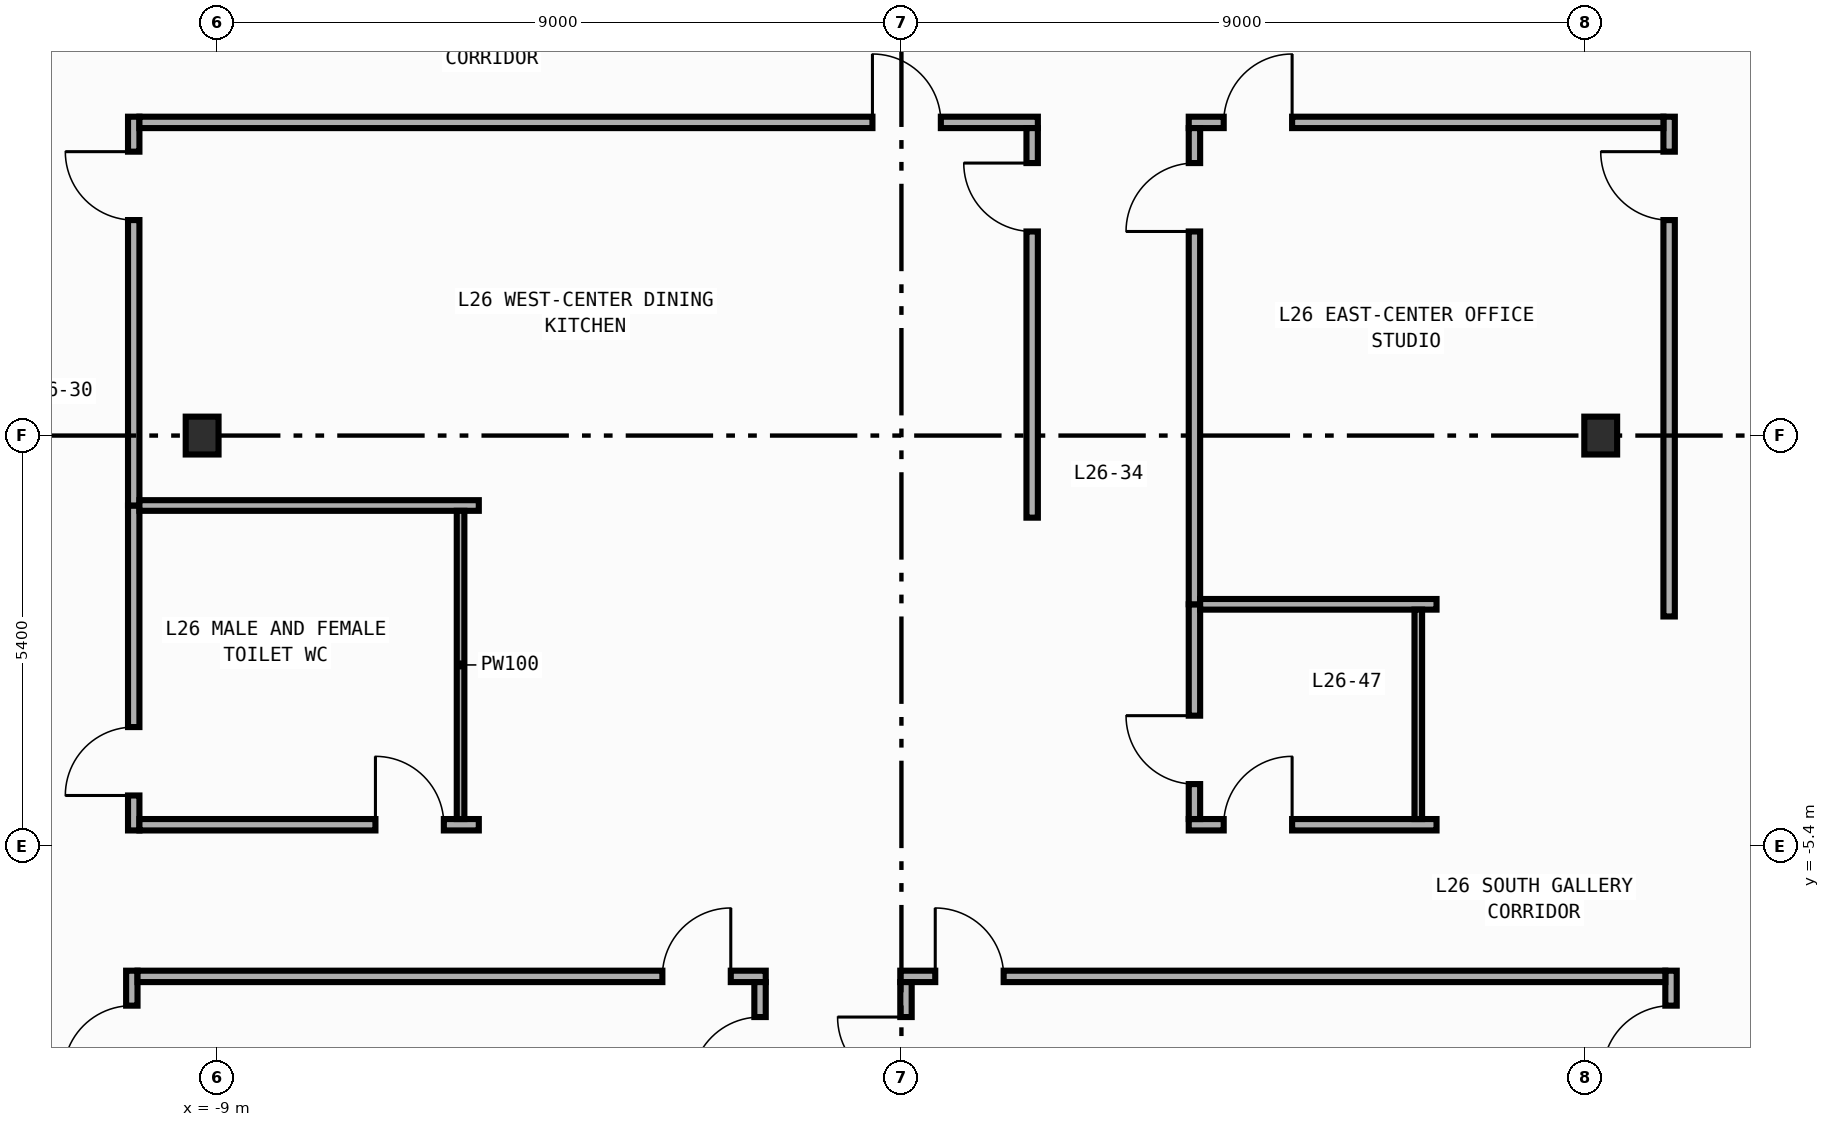
"""IFC4 building model, lengths in metres.
Left out: names, types, materials, properties, quantities, classifications, styles, units other than length and angle.
Written with IfcOpenShell. Run it as: python <this file> out.ifc"""

import sys

from ifc_helpers import new_model, si_unit, direction, frame, frame_2d, origin, origin_2d, place, context, subcontext, project, spatial, rectangle, i_section, extrude, element, fill, save


model = new_model("IFC4")
c1 = context("Model", 3, precision=1e-05, world=origin(), true_north=direction((0.0, 1.0)))
c2 = subcontext(c1, "Body", "Model", "MODEL_VIEW")
j1 = project(units=[si_unit("LENGTHUNIT", "METRE"), si_unit("PLANEANGLEUNIT", "RADIAN")], contexts=[c1])
p1 = place(None, origin())
s1 = spatial("IfcSite", under=j1, at=p1, CompositionType="ELEMENT")
p2 = place(p1, origin())
s2 = spatial("IfcBuilding", under=s1, at=p2, CompositionType="ELEMENT")
p3 = place(p2, frame((0.0, 0.0, 114.2)))
s3 = spatial("IfcBuildingStorey", under=s2, at=p3, CompositionType="ELEMENT", Elevation=114.2)
for number, where, z_axis, x_axis in (
    (1, (-9.2, 0.0, 0.0), (0.0, 0.0, 1.0), (1.0, 0.0, 0.0)),
    (2, (9.2, 0.0, 0.0), (0.0, 0.0, 1.0), (1.0, 0.0, 0.0)),
):
    element("IfcColumn", number, at=place(p3, frame(where, z_axis=z_axis, x_axis=x_axis)), inside=s3, PredefinedType="COLUMN", context=c2, shape_type="SweptSolid", body=[
        extrude(i_section(OverallWidth=0.432, OverallDepth=0.498, WebThickness=0.045, FlangeThickness=0.07, FilletRadius=0.022, at=origin_2d()), origin(), (0.0, 0.0, 1.0), 4.2),
    ])
p4 = place(p3, frame((-10.1, -5.195, 0.0), z_axis=(0.0, 0.0, 1.0), x_axis=(0.0, 1.0, 0.0)))
e3 = element("IfcWall", 3, at=p4, inside=s3, PredefinedType="PARTITIONING", context=c2, shape_type="SweptSolid", body=[
    extrude(rectangle(XDim=4.275, YDim=0.15, at=frame_2d((2.138, 0.0))), origin(), (0.0, 0.0, 1.0), 3.94),
])
p5 = place(p4, frame((0.46, 0.0, 0.0)))
e4 = element("IfcOpeningElement", 4, at=p5, cuts=e3, PredefinedType="OPENING", context=c2, shape_type="SweptSolid", body=[
    extrude(rectangle(XDim=0.9, YDim=2.15, at=frame_2d((0.45, 1.075))), frame((0.0, 0.085, 0.0), z_axis=(0.0, -1.0, 0.0), x_axis=(1.0, 0.0, 0.0)), (0.0, 0.0, 1.0), 0.17),
])
p6 = place(p3, frame((-10.1, -0.92, 0.0), z_axis=(0.0, 0.0, 1.0), x_axis=(0.0, 1.0, 0.0)))
e5 = element("IfcWall", 5, at=p6, inside=s3, PredefinedType="PARTITIONING", context=c2, shape_type="SweptSolid", body=[
    extrude(rectangle(XDim=5.115, YDim=0.15, at=frame_2d((2.558, 0.0))), origin(), (0.0, 0.0, 1.0), 3.94),
])
p7 = place(p6, frame((3.755, 0.0, 0.0)))
e6 = element("IfcOpeningElement", 6, at=p7, cuts=e5, PredefinedType="OPENING", context=c2, shape_type="SweptSolid", body=[
    extrude(rectangle(XDim=0.9, YDim=2.15, at=frame_2d((0.45, 1.075))), frame((0.0, 0.085, 0.0), z_axis=(0.0, -1.0, 0.0), x_axis=(1.0, 0.0, 0.0)), (0.0, 0.0, 1.0), 0.17),
])
p8 = place(p3, frame((-10.125, -12.44, 0.0), z_axis=(0.0, 0.0, 1.0), x_axis=(0.0, 1.0, 0.0)))
e7 = element("IfcWall", 7, at=p8, inside=s3, PredefinedType="PARTITIONING", context=c2, shape_type="SweptSolid", body=[
    extrude(rectangle(XDim=5.4, YDim=0.15, at=frame_2d((2.7, 0.0))), origin(), (0.0, 0.0, 1.0), 3.94),
])
p9 = place(p8, frame((4.04, 0.0, 0.0)))
e8 = element("IfcOpeningElement", 8, at=p9, cuts=e7, PredefinedType="OPENING", context=c2, shape_type="SweptSolid", body=[
    extrude(rectangle(XDim=0.9, YDim=2.15, at=frame_2d((0.45, 1.075))), frame((0.0, 0.085, 0.0), z_axis=(0.0, -1.0, 0.0), x_axis=(1.0, 0.0, 0.0)), (0.0, 0.0, 1.0), 0.17),
])
p10 = place(p3, frame((10.1, -2.38, 0.0), z_axis=(0.0, 0.0, 1.0), x_axis=(0.0, 1.0, 0.0)))
e9 = element("IfcWall", 9, at=p10, inside=s3, PredefinedType="PARTITIONING", context=c2, shape_type="SweptSolid", body=[
    extrude(rectangle(XDim=6.575, YDim=0.15, at=frame_2d((3.288, 0.0))), origin(), (0.0, 0.0, 1.0), 3.94),
])
p11 = place(p10, frame((5.215, 0.0, 0.0)))
e10 = element("IfcOpeningElement", 10, at=p11, cuts=e9, PredefinedType="OPENING", context=c2, shape_type="SweptSolid", body=[
    extrude(rectangle(XDim=0.9, YDim=2.15, at=frame_2d((0.45, 1.075))), frame((0.0, 0.085, 0.0), z_axis=(0.0, -1.0, 0.0), x_axis=(1.0, 0.0, 0.0)), (0.0, 0.0, 1.0), 0.17),
])
p12 = place(p3, frame((10.125, -14.44, 0.0), z_axis=(0.0, 0.0, 1.0), x_axis=(0.0, 1.0, 0.0)))
e11 = element("IfcWall", 11, at=p12, inside=s3, PredefinedType="PARTITIONING", context=c2, shape_type="SweptSolid", body=[
    extrude(rectangle(XDim=7.4, YDim=0.15, at=frame_2d((3.7, 0.0))), origin(), (0.0, 0.0, 1.0), 3.94),
])
p13 = place(p12, frame((6.04, 0.0, 0.0)))
e12 = element("IfcOpeningElement", 12, at=p13, cuts=e11, PredefinedType="OPENING", context=c2, shape_type="SweptSolid", body=[
    extrude(rectangle(XDim=0.9, YDim=2.15, at=frame_2d((0.45, 1.075))), frame((0.0, 0.085, 0.0), z_axis=(0.0, -1.0, 0.0), x_axis=(1.0, 0.0, 0.0)), (0.0, 0.0, 1.0), 0.17),
])
p14 = place(p3, frame((3.78, 4.12, 0.0), z_axis=(0.0, 0.0, 1.0), x_axis=(1.0, 0.0, 0.0)))
e13 = element("IfcWall", 13, at=p14, inside=s3, PredefinedType="PARTITIONING", context=c2, shape_type="SweptSolid", body=[
    extrude(rectangle(XDim=6.245, YDim=0.15, at=frame_2d((3.123, 0.0))), origin(), (0.0, 0.0, 1.0), 3.94),
])
p15 = place(p14, frame((0.46, 0.0, 0.0)))
e14 = element("IfcOpeningElement", 14, at=p15, cuts=e13, PredefinedType="OPENING", context=c2, shape_type="SweptSolid", body=[
    extrude(rectangle(XDim=0.9, YDim=2.15, at=frame_2d((0.45, 1.075))), frame((0.0, 0.085, 0.0), z_axis=(0.0, -1.0, 0.0), x_axis=(1.0, 0.0, 0.0)), (0.0, 0.0, 1.0), 0.17),
])
p16 = place(p3, frame((-10.025, 4.12, 0.0), z_axis=(0.0, 0.0, 1.0), x_axis=(1.0, 0.0, 0.0)))
e15 = element("IfcWall", 15, at=p16, inside=s3, PredefinedType="PARTITIONING", context=c2, shape_type="SweptSolid", body=[
    extrude(rectangle(XDim=11.82, YDim=0.15, at=frame_2d((5.91, 0.0))), origin(), (0.0, 0.0, 1.0), 3.94),
])
p17 = place(p16, frame((9.644, 0.0, 0.0)))
e16 = element("IfcOpeningElement", 16, at=p17, cuts=e15, PredefinedType="OPENING", context=c2, shape_type="SweptSolid", body=[
    extrude(rectangle(XDim=0.9, YDim=2.15, at=frame_2d((0.45, 1.075))), frame((0.0, 0.085, 0.0), z_axis=(0.0, -1.0, 0.0), x_axis=(1.0, 0.0, 0.0)), (0.0, 0.0, 1.0), 0.17),
])
p18 = place(p3, frame((3.78, -5.12, 0.0), z_axis=(0.0, 0.0, 1.0), x_axis=(1.0, 0.0, 0.0)))
e17 = element("IfcWall", 17, at=p18, inside=s3, PredefinedType="PARTITIONING", context=c2, shape_type="SweptSolid", body=[
    extrude(rectangle(XDim=3.26, YDim=0.15, at=frame_2d((1.63, 0.0))), origin(), (0.0, 0.0, 1.0), 3.94),
])
p19 = place(p18, frame((0.46, 0.0, 0.0)))
e18 = element("IfcOpeningElement", 18, at=p19, cuts=e17, PredefinedType="OPENING", context=c2, shape_type="SweptSolid", body=[
    extrude(rectangle(XDim=0.9, YDim=2.15, at=frame_2d((0.45, 1.075))), frame((0.0, 0.085, 0.0), z_axis=(0.0, -1.0, 0.0), x_axis=(1.0, 0.0, 0.0)), (0.0, 0.0, 1.0), 0.17),
])
p20 = place(p3, frame((-10.025, -5.12, 0.0), z_axis=(0.0, 0.0, 1.0), x_axis=(1.0, 0.0, 0.0)))
e19 = element("IfcWall", 19, at=p20, inside=s3, PredefinedType="PARTITIONING", context=c2, shape_type="SweptSolid", body=[
    extrude(rectangle(XDim=4.465, YDim=0.15, at=frame_2d((2.232, 0.0))), origin(), (0.0, 0.0, 1.0), 3.94),
])
p21 = place(p20, frame((3.105, 0.0, 0.0)))
e20 = element("IfcOpeningElement", 20, at=p21, cuts=e19, PredefinedType="OPENING", context=c2, shape_type="SweptSolid", body=[
    extrude(rectangle(XDim=0.9, YDim=2.15, at=frame_2d((0.45, 1.075))), frame((0.0, 0.085, 0.0), z_axis=(0.0, -1.0, 0.0), x_axis=(1.0, 0.0, 0.0)), (0.0, 0.0, 1.0), 0.17),
])
p22 = place(p3, frame((-10.05, -7.115, 0.0), z_axis=(0.0, 0.0, 1.0), x_axis=(1.0, 0.0, 0.0)))
e21 = element("IfcWall", 21, at=p22, inside=s3, PredefinedType="PARTITIONING", context=c2, shape_type="SweptSolid", body=[
    extrude(rectangle(XDim=8.265, YDim=0.15, at=frame_2d((4.133, 0.0))), origin(), (0.0, 0.0, 1.0), 3.94),
])
p23 = place(p22, frame((6.905, 0.0, 0.0)))
e22 = element("IfcOpeningElement", 22, at=p23, cuts=e21, PredefinedType="OPENING", context=c2, shape_type="SweptSolid", body=[
    extrude(rectangle(XDim=0.9, YDim=2.15, at=frame_2d((0.45, 1.075))), frame((0.0, 0.085, 0.0), z_axis=(0.0, -1.0, 0.0), x_axis=(1.0, 0.0, 0.0)), (0.0, 0.0, 1.0), 0.17),
])
p24 = place(p3, frame((-0.015, -7.115, 0.0), z_axis=(0.0, 0.0, 1.0), x_axis=(1.0, 0.0, 0.0)))
e23 = element("IfcWall", 23, at=p24, inside=s3, PredefinedType="PARTITIONING", context=c2, shape_type="SweptSolid", body=[
    extrude(rectangle(XDim=10.065, YDim=0.15, at=frame_2d((5.032, 0.0))), origin(), (0.0, 0.0, 1.0), 3.94),
])
p25 = place(p24, frame((0.46, 0.0, 0.0)))
e24 = element("IfcOpeningElement", 24, at=p25, cuts=e23, PredefinedType="OPENING", context=c2, shape_type="SweptSolid", body=[
    extrude(rectangle(XDim=0.9, YDim=2.15, at=frame_2d((0.45, 1.075))), frame((0.0, 0.085, 0.0), z_axis=(0.0, -1.0, 0.0), x_axis=(1.0, 0.0, 0.0)), (0.0, 0.0, 1.0), 0.17),
])
p26 = place(p3, frame((3.855, -5.045, 0.0), z_axis=(0.0, 0.0, 1.0), x_axis=(0.0, 1.0, 0.0)))
e25 = element("IfcWall", 25, at=p26, inside=s3, PredefinedType="PARTITIONING", context=c2, shape_type="SweptSolid", body=[
    extrude(rectangle(XDim=2.825, YDim=0.15, at=frame_2d((1.413, 0.0))), origin(), (0.0, 0.0, 1.0), 3.94),
])
p27 = place(p26, frame((0.46, 0.0, 0.0)))
e26 = element("IfcOpeningElement", 26, at=p27, cuts=e25, PredefinedType="OPENING", context=c2, shape_type="SweptSolid", body=[
    extrude(rectangle(XDim=0.9, YDim=2.15, at=frame_2d((0.45, 1.075))), frame((0.0, 0.085, 0.0), z_axis=(0.0, -1.0, 0.0), x_axis=(1.0, 0.0, 0.0)), (0.0, 0.0, 1.0), 0.17),
])
p28 = place(p3, frame((3.855, -2.22, 0.0), z_axis=(0.0, 0.0, 1.0), x_axis=(0.0, 1.0, 0.0)))
e27 = element("IfcWall", 27, at=p28, inside=s3, PredefinedType="PARTITIONING", context=c2, shape_type="SweptSolid", body=[
    extrude(rectangle(XDim=6.265, YDim=0.15, at=frame_2d((3.132, 0.0))), origin(), (0.0, 0.0, 1.0), 3.94),
])
p29 = place(p28, frame((4.905, 0.0, 0.0)))
e28 = element("IfcOpeningElement", 28, at=p29, cuts=e27, PredefinedType="OPENING", context=c2, shape_type="SweptSolid", body=[
    extrude(rectangle(XDim=0.9, YDim=2.15, at=frame_2d((0.45, 1.075))), frame((0.0, 0.085, 0.0), z_axis=(0.0, -1.0, 0.0), x_axis=(1.0, 0.0, 0.0)), (0.0, 0.0, 1.0), 0.17),
])
p30 = place(p3, frame((1.72, -1.08, 0.0), z_axis=(0.0, 0.0, 1.0), x_axis=(0.0, 1.0, 0.0)))
e29 = element("IfcWall", 29, at=p30, inside=s3, PredefinedType="PARTITIONING", context=c2, shape_type="SweptSolid", body=[
    extrude(rectangle(XDim=5.125, YDim=0.15, at=frame_2d((2.562, 0.0))), origin(), (0.0, 0.0, 1.0), 3.94),
])
p31 = place(p30, frame((3.765, 0.0, 0.0)))
e30 = element("IfcOpeningElement", 30, at=p31, cuts=e29, PredefinedType="OPENING", context=c2, shape_type="SweptSolid", body=[
    extrude(rectangle(XDim=0.9, YDim=2.15, at=frame_2d((0.45, 1.075))), frame((0.0, 0.085, 0.0), z_axis=(0.0, -1.0, 0.0), x_axis=(1.0, 0.0, 0.0)), (0.0, 0.0, 1.0), 0.17),
])
p32 = place(p3, frame((-1.86, -14.865, 0.0), z_axis=(0.0, 0.0, 1.0), x_axis=(0.0, 1.0, 0.0)))
e31 = element("IfcWall", 31, at=p32, inside=s3, PredefinedType="PARTITIONING", context=c2, shape_type="SweptSolid", body=[
    extrude(rectangle(XDim=7.675, YDim=0.15, at=frame_2d((3.837, 0.0))), origin(), (0.0, 0.0, 1.0), 3.94),
])
p33 = place(p32, frame((6.315, 0.0, 0.0)))
e32 = element("IfcOpeningElement", 32, at=p33, cuts=e31, PredefinedType="OPENING", context=c2, shape_type="SweptSolid", body=[
    extrude(rectangle(XDim=0.9, YDim=2.15, at=frame_2d((0.45, 1.075))), frame((0.0, 0.085, 0.0), z_axis=(0.0, -1.0, 0.0), x_axis=(1.0, 0.0, 0.0)), (0.0, 0.0, 1.0), 0.17),
])
p34 = place(p3, frame((0.06, -14.865, 0.0), z_axis=(0.0, 0.0, 1.0), x_axis=(0.0, 1.0, 0.0)))
e33 = element("IfcWall", 33, at=p34, inside=s3, PredefinedType="PARTITIONING", context=c2, shape_type="SweptSolid", body=[
    extrude(rectangle(XDim=7.675, YDim=0.15, at=frame_2d((3.837, 0.0))), origin(), (0.0, 0.0, 1.0), 3.94),
])
p35 = place(p34, frame((6.315, 0.0, 0.0)))
e34 = element("IfcOpeningElement", 34, at=p35, cuts=e33, PredefinedType="OPENING", context=c2, shape_type="SweptSolid", body=[
    extrude(rectangle(XDim=0.9, YDim=2.15, at=frame_2d((0.45, 1.075))), frame((0.0, 0.085, 0.0), z_axis=(0.0, -1.0, 0.0), x_axis=(1.0, 0.0, 0.0)), (0.0, 0.0, 1.0), 0.17),
])
p36 = place(p3, frame((3.93, -2.22, 0.0), z_axis=(0.0, 0.0, 1.0), x_axis=(1.0, 0.0, 0.0)))
e35 = element("IfcWall", 35, at=p36, inside=s3, PredefinedType="PARTITIONING", context=c2, shape_type="SweptSolid", body=[
    extrude(rectangle(XDim=3.11, YDim=0.14, at=frame_2d((1.555, 0.0))), origin(), (0.0, 0.0, 1.0), 3.94),
])
p37 = place(p3, frame((-10.025, -0.92, 0.0), z_axis=(0.0, 0.0, 1.0), x_axis=(1.0, 0.0, 0.0)))
e36 = element("IfcWall", 36, at=p37, inside=s3, PredefinedType="PARTITIONING", context=c2, shape_type="SweptSolid", body=[
    extrude(rectangle(XDim=4.465, YDim=0.14, at=frame_2d((2.232, 0.0))), origin(), (0.0, 0.0, 1.0), 3.94),
])
p38 = place(p3, frame((6.8, -2.29, 0.0), z_axis=(0.0, 0.0, 1.0), x_axis=(0.0, -1.0, 0.0)))
e37 = element("IfcWall", 37, at=p38, inside=s3, PredefinedType="PARTITIONING", context=c2, shape_type="SweptSolid", body=[
    extrude(rectangle(XDim=2.755, YDim=0.1, at=frame_2d((1.377, 0.0))), origin(), (0.0, 0.0, 1.0), 3.94),
])
p39 = place(p3, frame((-5.8, -0.99, 0.0), z_axis=(0.0, 0.0, 1.0), x_axis=(0.0, -1.0, 0.0)))
e38 = element("IfcWall", 38, at=p39, inside=s3, PredefinedType="PARTITIONING", context=c2, shape_type="SweptSolid", body=[
    extrude(rectangle(XDim=4.055, YDim=0.1, at=frame_2d((2.027, 0.0))), origin(), (0.0, 0.0, 1.0), 3.94),
])
p40 = place(p5, origin())
e39 = element("IfcDoor", 39, at=p40, inside=s3, OperationType="SINGLE_SWING_LEFT", PredefinedType="DOOR", context=c2, shape_type="SweptSolid", body=[
    extrude(rectangle(XDim=0.9, YDim=2.15, at=frame_2d((0.45, 1.075))), frame((0.0, 0.025, 0.0), z_axis=(0.0, -1.0, 0.0), x_axis=(1.0, 0.0, 0.0)), (0.0, 0.0, 1.0), 0.05),
])
fill(e4, e39)
p41 = place(p7, origin())
e40 = element("IfcDoor", 40, at=p41, inside=s3, OperationType="SINGLE_SWING_RIGHT", PredefinedType="DOOR", context=c2, shape_type="SweptSolid", body=[
    extrude(rectangle(XDim=0.9, YDim=2.15, at=frame_2d((0.45, 1.075))), frame((0.0, 0.025, 0.0), z_axis=(0.0, -1.0, 0.0), x_axis=(1.0, 0.0, 0.0)), (0.0, 0.0, 1.0), 0.05),
])
fill(e6, e40)
p42 = place(p9, origin())
e41 = element("IfcDoor", 41, at=p42, inside=s3, OperationType="SINGLE_SWING_LEFT", PredefinedType="DOOR", context=c2, shape_type="SweptSolid", body=[
    extrude(rectangle(XDim=0.9, YDim=2.15, at=frame_2d((0.45, 1.075))), frame((0.0, 0.025, 0.0), z_axis=(0.0, -1.0, 0.0), x_axis=(1.0, 0.0, 0.0)), (0.0, 0.0, 1.0), 0.05),
])
fill(e8, e41)
p43 = place(p11, origin())
e42 = element("IfcDoor", 42, at=p43, inside=s3, OperationType="SINGLE_SWING_RIGHT", PredefinedType="DOOR", context=c2, shape_type="SweptSolid", body=[
    extrude(rectangle(XDim=0.9, YDim=2.15, at=frame_2d((0.45, 1.075))), frame((0.0, 0.025, 0.0), z_axis=(0.0, -1.0, 0.0), x_axis=(1.0, 0.0, 0.0)), (0.0, 0.0, 1.0), 0.05),
])
fill(e10, e42)
p44 = place(p13, origin())
e43 = element("IfcDoor", 43, at=p44, inside=s3, OperationType="SINGLE_SWING_LEFT", PredefinedType="DOOR", context=c2, shape_type="SweptSolid", body=[
    extrude(rectangle(XDim=0.9, YDim=2.15, at=frame_2d((0.45, 1.075))), frame((0.0, 0.025, 0.0), z_axis=(0.0, -1.0, 0.0), x_axis=(1.0, 0.0, 0.0)), (0.0, 0.0, 1.0), 0.05),
])
fill(e12, e43)
p45 = place(p15, origin())
e44 = element("IfcDoor", 44, at=p45, inside=s3, OperationType="SINGLE_SWING_RIGHT", PredefinedType="DOOR", context=c2, shape_type="SweptSolid", body=[
    extrude(rectangle(XDim=0.9, YDim=2.15, at=frame_2d((0.45, 1.075))), frame((0.0, 0.025, 0.0), z_axis=(0.0, -1.0, 0.0), x_axis=(1.0, 0.0, 0.0)), (0.0, 0.0, 1.0), 0.05),
])
fill(e14, e44)
p46 = place(p17, origin())
e45 = element("IfcDoor", 45, at=p46, inside=s3, OperationType="SINGLE_SWING_LEFT", PredefinedType="DOOR", context=c2, shape_type="SweptSolid", body=[
    extrude(rectangle(XDim=0.9, YDim=2.15, at=frame_2d((0.45, 1.075))), frame((0.0, 0.025, 0.0), z_axis=(0.0, -1.0, 0.0), x_axis=(1.0, 0.0, 0.0)), (0.0, 0.0, 1.0), 0.05),
])
fill(e16, e45)
p47 = place(p19, origin())
e46 = element("IfcDoor", 46, at=p47, inside=s3, OperationType="SINGLE_SWING_RIGHT", PredefinedType="DOOR", context=c2, shape_type="SweptSolid", body=[
    extrude(rectangle(XDim=0.9, YDim=2.15, at=frame_2d((0.45, 1.075))), frame((0.0, 0.025, 0.0), z_axis=(0.0, -1.0, 0.0), x_axis=(1.0, 0.0, 0.0)), (0.0, 0.0, 1.0), 0.05),
])
fill(e18, e46)
p48 = place(p21, origin())
e47 = element("IfcDoor", 47, at=p48, inside=s3, OperationType="SINGLE_SWING_LEFT", PredefinedType="DOOR", context=c2, shape_type="SweptSolid", body=[
    extrude(rectangle(XDim=0.9, YDim=2.15, at=frame_2d((0.45, 1.075))), frame((0.0, 0.025, 0.0), z_axis=(0.0, -1.0, 0.0), x_axis=(1.0, 0.0, 0.0)), (0.0, 0.0, 1.0), 0.05),
])
fill(e20, e47)
p49 = place(p23, origin())
e48 = element("IfcDoor", 48, at=p49, inside=s3, OperationType="SINGLE_SWING_RIGHT", PredefinedType="DOOR", context=c2, shape_type="SweptSolid", body=[
    extrude(rectangle(XDim=0.9, YDim=2.15, at=frame_2d((0.45, 1.075))), frame((0.0, 0.025, 0.0), z_axis=(0.0, -1.0, 0.0), x_axis=(1.0, 0.0, 0.0)), (0.0, 0.0, 1.0), 0.05),
])
fill(e22, e48)
p50 = place(p25, origin())
e49 = element("IfcDoor", 49, at=p50, inside=s3, OperationType="SINGLE_SWING_LEFT", PredefinedType="DOOR", context=c2, shape_type="SweptSolid", body=[
    extrude(rectangle(XDim=0.9, YDim=2.15, at=frame_2d((0.45, 1.075))), frame((0.0, 0.025, 0.0), z_axis=(0.0, -1.0, 0.0), x_axis=(1.0, 0.0, 0.0)), (0.0, 0.0, 1.0), 0.05),
])
fill(e24, e49)
p51 = place(p27, origin())
e50 = element("IfcDoor", 50, at=p51, inside=s3, OperationType="SINGLE_SWING_RIGHT", PredefinedType="DOOR", context=c2, shape_type="SweptSolid", body=[
    extrude(rectangle(XDim=0.9, YDim=2.15, at=frame_2d((0.45, 1.075))), frame((0.0, 0.025, 0.0), z_axis=(0.0, -1.0, 0.0), x_axis=(1.0, 0.0, 0.0)), (0.0, 0.0, 1.0), 0.05),
])
fill(e26, e50)
p52 = place(p29, origin())
e51 = element("IfcDoor", 51, at=p52, inside=s3, OperationType="SINGLE_SWING_LEFT", PredefinedType="DOOR", context=c2, shape_type="SweptSolid", body=[
    extrude(rectangle(XDim=0.9, YDim=2.15, at=frame_2d((0.45, 1.075))), frame((0.0, 0.025, 0.0), z_axis=(0.0, -1.0, 0.0), x_axis=(1.0, 0.0, 0.0)), (0.0, 0.0, 1.0), 0.05),
])
fill(e28, e51)
p53 = place(p31, origin())
e52 = element("IfcDoor", 52, at=p53, inside=s3, OperationType="SINGLE_SWING_RIGHT", PredefinedType="DOOR", context=c2, shape_type="SweptSolid", body=[
    extrude(rectangle(XDim=0.9, YDim=2.15, at=frame_2d((0.45, 1.075))), frame((0.0, 0.025, 0.0), z_axis=(0.0, -1.0, 0.0), x_axis=(1.0, 0.0, 0.0)), (0.0, 0.0, 1.0), 0.05),
])
fill(e30, e52)
p54 = place(p33, origin())
e53 = element("IfcDoor", 53, at=p54, inside=s3, OperationType="SINGLE_SWING_LEFT", PredefinedType="DOOR", context=c2, shape_type="SweptSolid", body=[
    extrude(rectangle(XDim=0.9, YDim=2.15, at=frame_2d((0.45, 1.075))), frame((0.0, 0.025, 0.0), z_axis=(0.0, -1.0, 0.0), x_axis=(1.0, 0.0, 0.0)), (0.0, 0.0, 1.0), 0.05),
])
fill(e32, e53)
p55 = place(p35, origin())
e54 = element("IfcDoor", 54, at=p55, inside=s3, OperationType="SINGLE_SWING_RIGHT", PredefinedType="DOOR", context=c2, shape_type="SweptSolid", body=[
    extrude(rectangle(XDim=0.9, YDim=2.15, at=frame_2d((0.45, 1.075))), frame((0.0, 0.025, 0.0), z_axis=(0.0, -1.0, 0.0), x_axis=(1.0, 0.0, 0.0)), (0.0, 0.0, 1.0), 0.05),
])
fill(e34, e54)
save(model, sys.argv[1])
